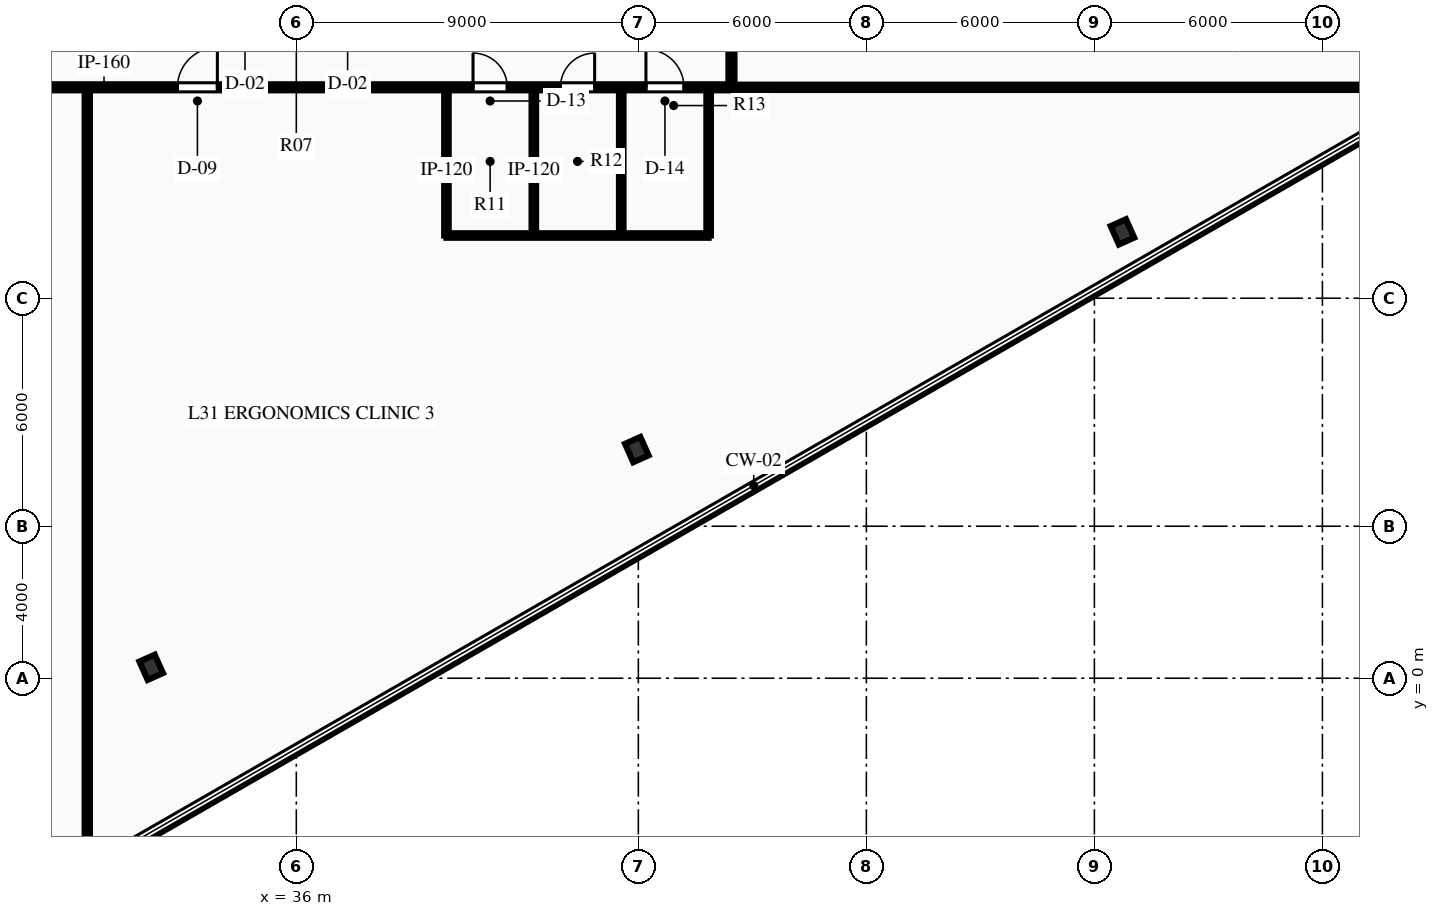
"""IFC4 building model, lengths in metres.
Left out: names, types, materials, properties, quantities, classifications, styles, units other than length and angle.
Written with IfcOpenShell. Run it as: python <this file> out.ifc"""

import sys

from ifc_helpers import new_model, si_unit, direction, frame, frame_2d, origin, origin_2d, place, context, subcontext, project, spatial, rectangle, i_section, extrude, element, fill, save


model = new_model("IFC4")
c1 = context("Model", 3, precision=1e-05, world=origin(), true_north=direction((0.0, 1.0)))
c2 = subcontext(c1, "Body", "Model", "MODEL_VIEW")
j1 = project(units=[si_unit("LENGTHUNIT", "METRE"), si_unit("PLANEANGLEUNIT", "RADIAN")], contexts=[c1])
p1 = place(None, origin())
s1 = spatial("IfcSite", under=j1, at=p1, CompositionType="ELEMENT")
p2 = place(p1, origin())
s2 = spatial("IfcBuilding", under=s1, at=p2, CompositionType="ELEMENT")
p3 = place(p2, frame((0.0, 0.0, 127.95)))
s3 = spatial("IfcBuildingStorey", under=s2, at=p3, CompositionType="ELEMENT", Elevation=127.95)
for number, where, z_axis, x_axis in (
    (1, (32.181, 0.287, 0.0), (0.0, 0.0, 1.0), (0.912, 0.409, 0.0)),
    (2, (44.96, 6.017, 0.0), (0.0, 0.0, 1.0), (0.912, 0.409, 0.0)),
    (3, (57.738, 11.746, 0.0), (0.0, 0.0, 1.0), (0.912, 0.409, 0.0)),
):
    element("IfcColumn", number, at=place(p3, frame(where, z_axis=z_axis, x_axis=x_axis)), inside=s3, PredefinedType="COLUMN", context=c2, shape_type="SweptSolid", body=[
        extrude(i_section(OverallWidth=0.442, OverallDepth=0.531, WebThickness=0.066, FlangeThickness=0.106, at=origin_2d()), origin(), (0.0, 0.0, 1.0), 3.75),
    ])
p4 = place(p3, frame((24.5, 15.55, 0.0), z_axis=(0.0, 0.0, 1.0), x_axis=(1.0, 0.0, 0.0)))
e4 = element("IfcWall", 4, at=p4, inside=s3, PredefinedType="PARTITIONING", context=c2, shape_type="SweptSolid", body=[
    extrude(rectangle(XDim=23.0, YDim=0.16, at=frame_2d((11.5, 0.0))), origin(), (0.0, 0.0, 1.0), 3.4),
])
p5 = place(p4, frame((16.15, 0.0, 0.0)))
e5 = element("IfcOpeningElement", 5, at=p5, cuts=e4, PredefinedType="OPENING", context=c2, shape_type="SweptSolid", body=[
    extrude(rectangle(XDim=0.9, YDim=2.15, at=frame_2d((0.45, 1.075))), frame((0.0, 0.09, 0.0), z_axis=(0.0, -1.0, 0.0), x_axis=(1.0, 0.0, 0.0)), (0.0, 0.0, 1.0), 0.18),
])
p6 = place(p4, frame((18.45, 0.0, 0.0)))
e6 = element("IfcOpeningElement", 6, at=p6, cuts=e4, PredefinedType="OPENING", context=c2, shape_type="SweptSolid", body=[
    extrude(rectangle(XDim=0.9, YDim=2.15, at=frame_2d((0.45, 1.075))), frame((0.0, 0.09, 0.0), z_axis=(0.0, -1.0, 0.0), x_axis=(1.0, 0.0, 0.0)), (0.0, 0.0, 1.0), 0.18),
])
p7 = place(p4, frame((20.7, 0.0, 0.0)))
e7 = element("IfcOpeningElement", 7, at=p7, cuts=e4, PredefinedType="OPENING", context=c2, shape_type="SweptSolid", body=[
    extrude(rectangle(XDim=1.0, YDim=2.15, at=frame_2d((0.5, 1.075))), frame((0.0, 0.09, 0.0), z_axis=(0.0, -1.0, 0.0), x_axis=(1.0, 0.0, 0.0)), (0.0, 0.0, 1.0), 0.18),
])
p8 = place(p4, frame((3.781, 0.0, 0.0)))
e8 = element("IfcOpeningElement", 8, at=p8, cuts=e4, PredefinedType="OPENING", context=c2, shape_type="SweptSolid", body=[
    extrude(rectangle(XDim=1.05, YDim=2.15, at=frame_2d((0.525, 1.075))), frame((0.0, 0.09, 0.0), z_axis=(0.0, -1.0, 0.0), x_axis=(1.0, 0.0, 0.0)), (0.0, 0.0, 1.0), 0.18),
])
p9 = place(p4, frame((8.373, 0.0, 0.0)))
e9 = element("IfcOpeningElement", 9, at=p9, cuts=e4, PredefinedType="OPENING", context=c2, shape_type="SweptSolid", body=[
    extrude(rectangle(XDim=1.05, YDim=2.15, at=frame_2d((0.525, 1.075))), frame((0.0, 0.09, 0.0), z_axis=(0.0, -1.0, 0.0), x_axis=(1.0, 0.0, 0.0)), (0.0, 0.0, 1.0), 0.18),
])
p10 = place(p3, frame((47.45, 15.55, 0.0), z_axis=(0.0, 0.0, 1.0), x_axis=(0.0, 1.0, 0.0)))
e10 = element("IfcWall", 10, at=p10, inside=s3, PredefinedType="PARTITIONING", context=c2, shape_type="SweptSolid", body=[
    extrude(rectangle(XDim=20.9, YDim=0.16, at=frame_2d((10.45, 0.0))), origin(), (0.0, 0.0, 1.0), 3.4),
])
p11 = place(p10, frame((4.087, 0.0, 0.0)))
e11 = element("IfcOpeningElement", 11, at=p11, cuts=e10, PredefinedType="OPENING", context=c2, shape_type="SweptSolid", body=[
    extrude(rectangle(XDim=1.05, YDim=2.15, at=frame_2d((0.525, 1.075))), frame((0.0, 0.09, 0.0), z_axis=(0.0, -1.0, 0.0), x_axis=(1.0, 0.0, 0.0)), (0.0, 0.0, 1.0), 0.18),
])
p12 = place(p10, frame((7.885, 0.0, 0.0)))
e12 = element("IfcOpeningElement", 12, at=p12, cuts=e10, PredefinedType="OPENING", context=c2, shape_type="SweptSolid", body=[
    extrude(rectangle(XDim=1.05, YDim=2.15, at=frame_2d((0.525, 1.075))), frame((0.0, 0.09, 0.0), z_axis=(0.0, -1.0, 0.0), x_axis=(1.0, 0.0, 0.0)), (0.0, 0.0, 1.0), 0.18),
])
p13 = place(p10, frame((14.743, 0.0, 0.0)))
e13 = element("IfcOpeningElement", 13, at=p13, cuts=e10, PredefinedType="OPENING", context=c2, shape_type="SweptSolid", body=[
    extrude(rectangle(XDim=1.05, YDim=2.15, at=frame_2d((0.525, 1.075))), frame((0.0, 0.09, 0.0), z_axis=(0.0, -1.0, 0.0), x_axis=(1.0, 0.0, 0.0)), (0.0, 0.0, 1.0), 0.18),
])
for number, where, z_axis, x_axis in (
    (14, (39.95, 11.65, 0.0), (0.0, 0.0, 1.0), (0.0, 1.0, 0.0)),
    (15, (42.25, 11.65, 0.0), (0.0, 0.0, 1.0), (0.0, 1.0, 0.0)),
    (16, (44.55, 11.65, 0.0), (0.0, 0.0, 1.0), (0.0, 1.0, 0.0)),
    (17, (46.85, 11.65, 0.0), (0.0, 0.0, 1.0), (0.0, 1.0, 0.0)),
):
    element("IfcWall", number, at=place(p3, frame(where, z_axis=z_axis, x_axis=x_axis)), inside=s3, PredefinedType="PARTITIONING", context=c2, shape_type="SweptSolid", body=[
        extrude(rectangle(XDim=3.9, YDim=0.12, at=frame_2d((1.95, 0.0))), origin(), (0.0, 0.0, 1.0), 3.4),
    ])
p14 = place(p3, frame((39.95, 11.65, 0.0), z_axis=(0.0, 0.0, 1.0), x_axis=(1.0, 0.0, 0.0)))
e18 = element("IfcWall", 18, at=p14, inside=s3, PredefinedType="PARTITIONING", context=c2, shape_type="SweptSolid", body=[
    extrude(rectangle(XDim=6.9, YDim=0.12, at=frame_2d((3.45, 0.0))), origin(), (0.0, 0.0, 1.0), 3.4),
])
p15 = place(p3, frame((47.45, 15.55, 0.0), z_axis=(0.0, 0.0, 1.0), x_axis=(1.0, 0.0, 0.0)))
e19 = element("IfcWall", 19, at=p15, inside=s3, PredefinedType="PARTITIONING", context=c2, shape_type="SweptSolid", body=[
    extrude(rectangle(XDim=19.094, YDim=0.14, at=frame_2d((9.547, 0.0))), origin(), (0.0, 0.0, 1.0), 3.4),
])
p16 = place(p3, frame((30.5, -5.176, 0.0), z_axis=(0.0, 0.0, 1.0), x_axis=(0.0, 1.0, 0.0)))
e20 = element("IfcWall", 20, at=p16, inside=s3, PredefinedType="PARTITIONING", context=c2, shape_type="SweptSolid", body=[
    extrude(rectangle(XDim=20.726, YDim=0.14, at=frame_2d((10.363, 0.0))), origin(), (0.0, 0.0, 1.0), 3.4),
])
p17 = place(p5, origin())
e21 = element("IfcDoor", 21, at=p17, inside=s3, OperationType="SINGLE_SWING_LEFT", PredefinedType="DOOR", context=c2, shape_type="SweptSolid", body=[
    extrude(rectangle(XDim=0.9, YDim=2.15, at=frame_2d((0.45, 1.075))), frame((0.0, 0.025, 0.0), z_axis=(0.0, -1.0, 0.0), x_axis=(1.0, 0.0, 0.0)), (0.0, 0.0, 1.0), 0.05),
])
fill(e5, e21)
p18 = place(p6, origin())
e22 = element("IfcDoor", 22, at=p18, inside=s3, OperationType="SINGLE_SWING_RIGHT", PredefinedType="DOOR", context=c2, shape_type="SweptSolid", body=[
    extrude(rectangle(XDim=0.9, YDim=2.15, at=frame_2d((0.45, 1.075))), frame((0.0, 0.025, 0.0), z_axis=(0.0, -1.0, 0.0), x_axis=(1.0, 0.0, 0.0)), (0.0, 0.0, 1.0), 0.05),
])
fill(e6, e22)
p19 = place(p7, origin())
e23 = element("IfcDoor", 23, at=p19, inside=s3, OperationType="SINGLE_SWING_LEFT", PredefinedType="DOOR", context=c2, shape_type="SweptSolid", body=[
    extrude(rectangle(XDim=1.0, YDim=2.15, at=frame_2d((0.5, 1.075))), frame((0.0, 0.025, 0.0), z_axis=(0.0, -1.0, 0.0), x_axis=(1.0, 0.0, 0.0)), (0.0, 0.0, 1.0), 0.05),
])
fill(e7, e23)
p20 = place(p9, origin())
e24 = element("IfcDoor", 24, at=p20, inside=s3, OperationType="SINGLE_SWING_RIGHT", PredefinedType="DOOR", context=c2, shape_type="SweptSolid", body=[
    extrude(rectangle(XDim=1.05, YDim=2.15, at=frame_2d((0.525, 1.075))), frame((0.0, 0.025, 0.0), z_axis=(0.0, -1.0, 0.0), x_axis=(1.0, 0.0, 0.0)), (0.0, 0.0, 1.0), 0.05),
])
fill(e9, e24)
save(model, sys.argv[1])
